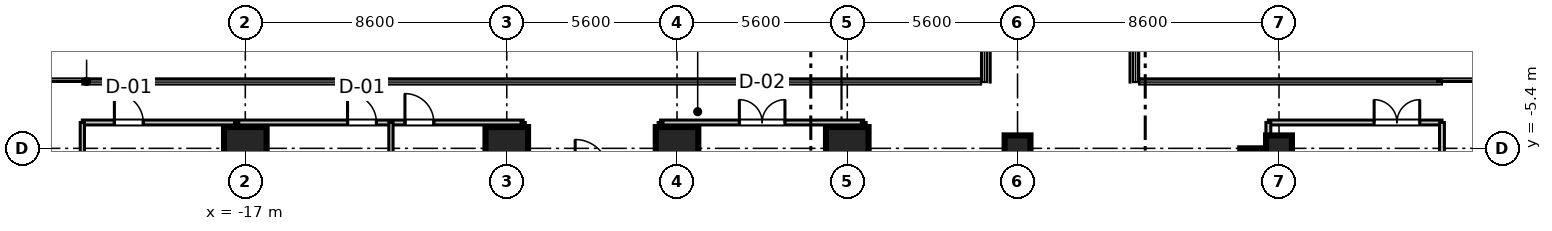
"""IFC4 building model, lengths in metres.
Left out: names, types, materials, properties, quantities, classifications, styles, units other than length and angle.
Written with IfcOpenShell. Run it as: python <this file> out.ifc"""

import sys

from ifc_helpers import new_model, si_unit, direction, frame, frame_2d, origin, origin_2d, place, context, subcontext, project, spatial, rectangle, extrude, source, transform, mapped, element, fill, save


model = new_model("IFC4")
c1 = context("Model", 3, precision=1e-05, world=origin(), true_north=direction((0.0, 1.0)))
c2 = subcontext(c1, "Body", "Model", "MODEL_VIEW")
j1 = project(units=[si_unit("LENGTHUNIT", "METRE"), si_unit("PLANEANGLEUNIT", "RADIAN")], contexts=[c1])
p1 = place(None, origin())
s1 = spatial("IfcSite", under=j1, at=p1, CompositionType="ELEMENT")
p2 = place(p1, origin())
s2 = spatial("IfcBuilding", under=s1, at=p2, CompositionType="ELEMENT")
p3 = place(p2, frame((0.0, 0.0, 47.0)))
s3 = spatial("IfcBuildingStorey", under=s2, at=p3, CompositionType="ELEMENT", Elevation=47.0)
m1 = source(origin(), c2, "Body", "SweptSolid", [
    extrude(rectangle(XDim=1.4, YDim=1.4, at=origin_2d()), origin(), (0.0, 0.0, 1.0), 3.605),
])
for number, where, z_axis, x_axis in (
    (1, (-17.0, -5.4, 0.0), (0.0, 0.0, 1.0), (1.0, 0.0, 0.0)),
    (2, (-8.4, -5.4, 0.0), (0.0, 0.0, 1.0), (1.0, 0.0, 0.0)),
    (3, (-2.8, -5.4, 0.0), (0.0, 0.0, 1.0), (1.0, 0.0, 0.0)),
    (4, (2.8, -5.4, 0.0), (0.0, 0.0, 1.0), (1.0, 0.0, 0.0)),
):
    element("IfcColumn", number, at=place(p3, frame(where, z_axis=z_axis, x_axis=x_axis)), inside=s3, PredefinedType="COLUMN", context=c2, shape_type="MappedRepresentation", body=[
        mapped(m1, transform((0.0, 0.0, 0.0), scale=1.0)),
    ])
m2 = source(origin(), c2, "Body", "SweptSolid", [
    extrude(rectangle(XDim=0.85, YDim=0.85, at=origin_2d()), origin(), (0.0, 0.0, 1.0), 3.605),
])
for number, where, z_axis, x_axis in (
    (5, (8.4, -5.4, 0.0), (0.0, 0.0, 1.0), (1.0, 0.0, 0.0)),
    (6, (17.0, -5.4, 0.0), (0.0, 0.0, 1.0), (1.0, 0.0, 0.0)),
):
    element("IfcColumn", number, at=place(p3, frame(where, z_axis=z_axis, x_axis=x_axis)), inside=s3, PredefinedType="PILASTER", context=c2, shape_type="MappedRepresentation", body=[
        mapped(m2, transform((0.0, 0.0, 0.0), scale=1.0)),
    ])
m3 = source(origin(), c2, "Body", "SweptSolid", [
    extrude(rectangle(XDim=11.6, YDim=0.65, at=frame_2d((5.8, 0.0))), origin(), (0.0, 0.0, 1.0), 3.37),
])
p4 = place(p3, frame((16.05, -17.0, 0.0), z_axis=(0.0, 0.0, 1.0), x_axis=(0.0, 1.0, 0.0)))
e7 = element("IfcWall", 7, at=p4, inside=s3, PredefinedType="SHEAR", context=c2, shape_type="MappedRepresentation", body=[
    mapped(m3, transform((0.0, 0.0, 0.0), scale=1.0)),
])
m4 = source(origin(), c2, "Body", "SweptSolid", [
    extrude(rectangle(XDim=5.71, YDim=0.16, at=frame_2d((2.855, 0.0))), origin(), (0.0, 0.0, 1.0), 2.71),
])
p5 = place(p3, frame((16.65, -4.55, 0.0), z_axis=(0.0, 0.0, 1.0), x_axis=(1.0, 0.0, 0.0)))
e8 = element("IfcWall", 8, at=p5, inside=s3, PredefinedType="PARTITIONING", context=c2, shape_type="MappedRepresentation", body=[
    mapped(m4, transform((0.0, 0.0, 0.0), scale=1.0)),
])
p6 = place(p5, frame((3.479, 0.0, 0.0)))
e9 = element("IfcOpeningElement", 9, at=p6, cuts=e8, PredefinedType="OPENING", context=c2, shape_type="SweptSolid", body=[
    extrude(rectangle(XDim=1.5, YDim=2.15, at=frame_2d((0.75, 1.075))), frame((0.0, 0.09, 0.0), z_axis=(0.0, -1.0, 0.0), x_axis=(1.0, 0.0, 0.0)), (0.0, 0.0, 1.0), 0.18),
])
m5 = source(origin(), c2, "Body", "SweptSolid", [
    extrude(rectangle(XDim=20.55, YDim=0.16, at=frame_2d((10.275, 0.0))), origin(), (0.0, 0.0, 1.0), 2.71),
])
p7 = place(p3, frame((16.65, -25.1, 0.0), z_axis=(0.0, 0.0, 1.0), x_axis=(0.0, 1.0, 0.0)))
e10 = element("IfcWall", 10, at=p7, inside=s3, PredefinedType="PARTITIONING", context=c2, shape_type="MappedRepresentation", body=[
    mapped(m5, transform((0.0, 0.0, 0.0), scale=1.0)),
])
m6 = source(origin(), c2, "Body", "SweptSolid", [
    extrude(rectangle(XDim=19.13, YDim=0.16, at=frame_2d((9.565, 0.0))), origin(), (0.0, 0.0, 1.0), 2.71),
])
p8 = place(p3, frame((22.36, -23.68, 0.0), z_axis=(0.0, 0.0, 1.0), x_axis=(0.0, 1.0, 0.0)))
e11 = element("IfcWall", 11, at=p8, inside=s3, PredefinedType="PARTITIONING", context=c2, shape_type="MappedRepresentation", body=[
    mapped(m6, transform((0.0, 0.0, 0.0), scale=1.0)),
])
m7 = source(origin(), c2, "Body", "SweptSolid", [
    extrude(rectangle(XDim=14.5, YDim=0.16, at=frame_2d((7.25, 0.0))), origin(), (0.0, 0.0, 1.0), 2.71),
])
p9 = place(p3, frame((-22.36, -4.55, 0.0), z_axis=(0.0, 0.0, 1.0), x_axis=(1.0, 0.0, 0.0)))
e12 = element("IfcWall", 12, at=p9, inside=s3, PredefinedType="PARTITIONING", context=c2, shape_type="MappedRepresentation", body=[
    mapped(m7, transform((0.0, 0.0, 0.0), scale=1.0)),
])
p10 = place(p9, frame((1.054, 0.0, 0.0)))
e13 = element("IfcOpeningElement", 13, at=p10, cuts=e12, PredefinedType="OPENING", context=c2, shape_type="SweptSolid", body=[
    extrude(rectangle(XDim=0.95, YDim=2.1, at=frame_2d((0.475, 1.05))), frame((0.0, 0.09, 0.0), z_axis=(0.0, -1.0, 0.0), x_axis=(1.0, 0.0, 0.0)), (0.0, 0.0, 1.0), 0.18),
])
p11 = place(p9, frame((8.723, 0.0, 0.0)))
e14 = element("IfcOpeningElement", 14, at=p11, cuts=e12, PredefinedType="OPENING", context=c2, shape_type="SweptSolid", body=[
    extrude(rectangle(XDim=0.95, YDim=2.1, at=frame_2d((0.475, 1.05))), frame((0.0, 0.09, 0.0), z_axis=(0.0, -1.0, 0.0), x_axis=(1.0, 0.0, 0.0)), (0.0, 0.0, 1.0), 0.18),
])
p12 = place(p9, frame((10.611, 0.0, 0.0)))
e15 = element("IfcOpeningElement", 15, at=p12, cuts=e12, PredefinedType="OPENING", context=c2, shape_type="SweptSolid", body=[
    extrude(rectangle(XDim=0.95, YDim=2.1, at=frame_2d((0.475, 1.05))), frame((0.0, 0.09, 0.0), z_axis=(0.0, -1.0, 0.0), x_axis=(1.0, 0.0, 0.0)), (0.0, 0.0, 1.0), 0.18),
])
m8 = source(origin(), c2, "Body", "SweptSolid", [
    extrude(rectangle(XDim=19.13, YDim=0.14, at=frame_2d((9.565, 0.0))), origin(), (0.0, 0.0, 1.0), 2.71),
])
p13 = place(p3, frame((-22.36, -23.68, 0.0), z_axis=(0.0, 0.0, 1.0), x_axis=(0.0, 1.0, 0.0)))
e16 = element("IfcWall", 16, at=p13, inside=s3, PredefinedType="PARTITIONING", context=c2, shape_type="MappedRepresentation", body=[
    mapped(m8, transform((0.0, 0.0, 0.0), scale=1.0)),
])
m9 = source(origin(), c2, "Body", "SweptSolid", [
    extrude(rectangle(XDim=20.55, YDim=0.14, at=frame_2d((10.275, 0.0))), origin(), (0.0, 0.0, 1.0), 2.71),
])
for number, where, z_axis, x_axis in (
    (17, (-7.86, -25.1, 0.0), (0.0, 0.0, 1.0), (0.0, 1.0, 0.0)),
    (18, (-17.285, -25.1, 0.0), (0.0, 0.0, 1.0), (0.0, 1.0, 0.0)),
    (19, (-12.21, -25.1, 0.0), (0.0, 0.0, 1.0), (0.0, 1.0, 0.0)),
):
    element("IfcWall", number, at=place(p3, frame(where, z_axis=z_axis, x_axis=x_axis)), inside=s3, PredefinedType="PARTITIONING", context=c2, shape_type="MappedRepresentation", body=[
        mapped(m9, transform((0.0, 0.0, 0.0), scale=1.0)),
    ])
m10 = source(origin(), c2, "Body", "SweptSolid", [
    extrude(rectangle(XDim=6.68, YDim=0.16, at=frame_2d((3.34, 0.0))), origin(), (0.0, 0.0, 1.0), 2.71),
])
p14 = place(p3, frame((-3.34, -4.55, 0.0), z_axis=(0.0, 0.0, 1.0), x_axis=(1.0, 0.0, 0.0)))
e20 = element("IfcWall", 20, at=p14, inside=s3, PredefinedType="PARTITIONING", context=c2, shape_type="MappedRepresentation", body=[
    mapped(m10, transform((0.0, 0.0, 0.0), scale=1.0)),
])
p15 = place(p14, frame((2.59, 0.0, 0.0)))
e21 = element("IfcOpeningElement", 21, at=p15, cuts=e20, PredefinedType="OPENING", context=c2, shape_type="SweptSolid", body=[
    extrude(rectangle(XDim=1.5, YDim=2.15, at=frame_2d((0.75, 1.075))), frame((0.0, 0.09, 0.0), z_axis=(0.0, -1.0, 0.0), x_axis=(1.0, 0.0, 0.0)), (0.0, 0.0, 1.0), 0.18),
])
for number, where, z_axis, x_axis in (
    (22, (-3.34, -25.1, 0.0), (0.0, 0.0, 1.0), (0.0, 1.0, 0.0)),
    (23, (3.34, -25.1, 0.0), (0.0, 0.0, 1.0), (0.0, 1.0, 0.0)),
):
    element("IfcWall", number, at=place(p3, frame(where, z_axis=z_axis, x_axis=x_axis)), inside=s3, PredefinedType="PARTITIONING", context=c2, shape_type="MappedRepresentation", body=[
        mapped(m5, transform((0.0, 0.0, 0.0), scale=1.0)),
    ])
m11 = source(origin(), c2, "Body", "SweptSolid", [
    extrude(rectangle(XDim=1.5, YDim=2.15, at=frame_2d((0.75, 1.075))), frame((0.0, 0.025, 0.0), z_axis=(0.0, -1.0, 0.0), x_axis=(1.0, 0.0, 0.0)), (0.0, 0.0, 1.0), 0.05),
])
p16 = place(p6, frame((1.5, 0.0, 0.0), z_axis=(0.0, 0.0, 1.0), x_axis=(-1.0, 0.0, 0.0)))
e24 = element("IfcDoor", 24, at=p16, inside=s3, OperationType="DOUBLE_DOOR_SINGLE_SWING", PredefinedType="DOOR", context=c2, shape_type="MappedRepresentation", body=[
    mapped(m11, transform((0.0, 0.0, 0.0), scale=1.0)),
])
fill(e9, e24)
m12 = source(origin(), c2, "Body", "SweptSolid", [
    extrude(rectangle(XDim=0.95, YDim=2.1, at=frame_2d((0.475, 1.05))), frame((0.0, 0.025, 0.0), z_axis=(0.0, -1.0, 0.0), x_axis=(1.0, 0.0, 0.0)), (0.0, 0.0, 1.0), 0.05),
])
p17 = place(p10, frame((0.95, 0.0, 0.0), z_axis=(0.0, 0.0, 1.0), x_axis=(-1.0, 0.0, 0.0)))
e25 = element("IfcDoor", 25, at=p17, inside=s3, OperationType="SINGLE_SWING_LEFT", PredefinedType="DOOR", context=c2, shape_type="MappedRepresentation", body=[
    mapped(m12, transform((0.0, 0.0, 0.0), scale=1.0)),
])
fill(e13, e25)
p18 = place(p11, frame((0.95, 0.0, 0.0), z_axis=(0.0, 0.0, 1.0), x_axis=(-1.0, 0.0, 0.0)))
e26 = element("IfcDoor", 26, at=p18, inside=s3, OperationType="SINGLE_SWING_LEFT", PredefinedType="DOOR", context=c2, shape_type="MappedRepresentation", body=[
    mapped(m12, transform((0.0, 0.0, 0.0), scale=1.0)),
])
fill(e14, e26)
p19 = place(p12, frame((0.95, 0.0, 0.0), z_axis=(0.0, 0.0, 1.0), x_axis=(-1.0, 0.0, 0.0)))
e27 = element("IfcDoor", 27, at=p19, inside=s3, OperationType="SINGLE_SWING_LEFT", PredefinedType="DOOR", context=c2, shape_type="MappedRepresentation", body=[
    mapped(m12, transform((0.0, 0.0, 0.0), scale=1.0)),
])
fill(e15, e27)
p20 = place(p15, frame((1.5, 0.0, 0.0), z_axis=(0.0, 0.0, 1.0), x_axis=(-1.0, 0.0, 0.0)))
e28 = element("IfcDoor", 28, at=p20, inside=s3, OperationType="DOUBLE_DOOR_SINGLE_SWING", PredefinedType="DOOR", context=c2, shape_type="MappedRepresentation", body=[
    mapped(m11, transform((0.0, 0.0, 0.0), scale=1.0)),
])
fill(e21, e28)
save(model, sys.argv[1])
